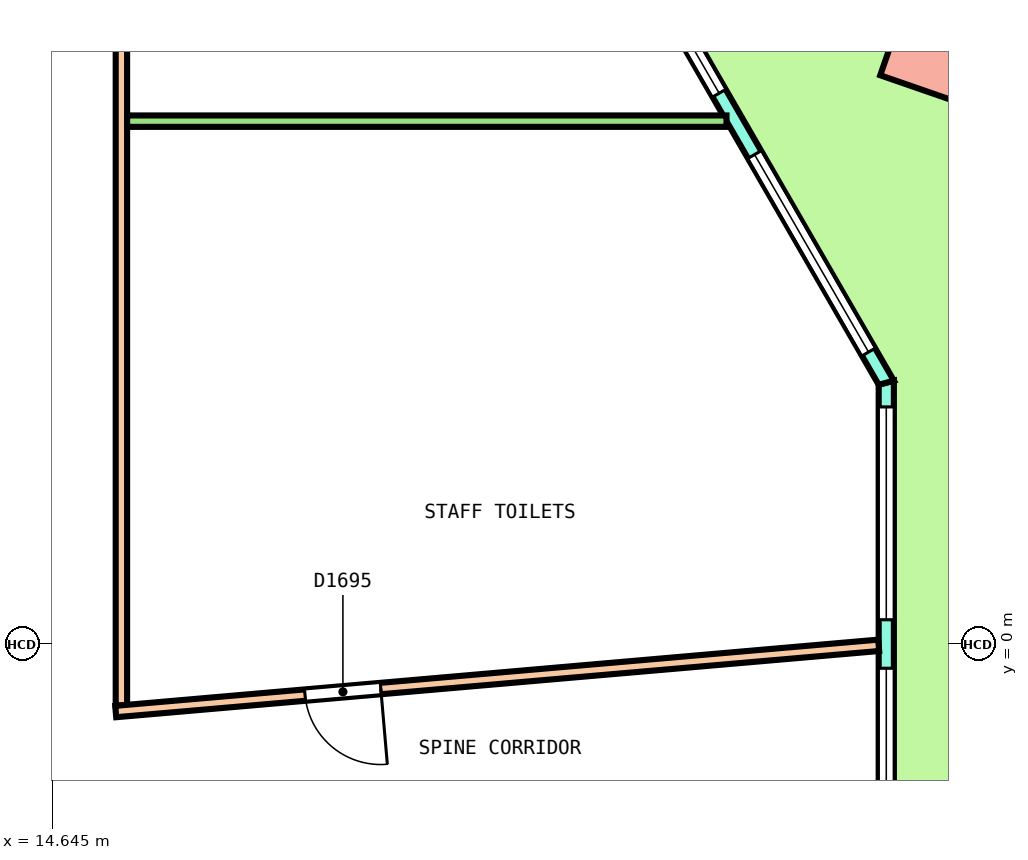
"""IFC4 building model, lengths in metres.
Left out: names, types, materials, properties, quantities, classifications, styles, units other than length and angle.
Written with IfcOpenShell. Run it as: python <this file> out.ifc"""

import sys

from ifc_helpers import new_model, si_unit, direction, frame, frame_2d, origin, origin_2d, place, context, subcontext, project, spatial, polyline, rectangle, outline, extrude, element, fill, save


model = new_model("IFC4")
c1 = context("Model", 3, precision=1e-05, world=origin(), true_north=direction((0.0, 1.0)))
c2 = subcontext(c1, "Body", "Model", "MODEL_VIEW")
j1 = project(units=[si_unit("LENGTHUNIT", "METRE"), si_unit("PLANEANGLEUNIT", "RADIAN")], contexts=[c1])
p1 = place(None, origin())
s1 = spatial("IfcSite", under=j1, at=p1, CompositionType="ELEMENT")
p2 = place(p1, origin())
s2 = spatial("IfcBuilding", under=s1, at=p2, CompositionType="ELEMENT")
p3 = place(p2, frame((0.0, 0.0, 145.2)))
s3 = spatial("IfcBuildingStorey", under=s2, at=p3, CompositionType="ELEMENT", Elevation=145.2)
p4 = place(p3, frame((26.297, 7.853, 0.0), z_axis=(0.021749390218, 0.025123256844, 0.9994477405), x_axis=(-0.500115620545, 0.865890253502, -0.010882783573)))
e1 = element("IfcColumn", 1, at=p4, inside=s3, PredefinedType="COLUMN", context=c2, shape_type="SweptSolid", body=[
    extrude(rectangle(XDim=1.2, YDim=1.2, at=origin_2d()), origin(), (0.0, 0.0, 1.0), 4.052),
])
p5 = place(p3, frame((25.613, -3.437, 0.0), z_axis=(0.0, 0.0, 1.0), x_axis=(0.0, 1.0, 0.0)))
e2 = element("IfcWall", 2, at=p5, inside=s3, PredefinedType="SOLIDWALL", context=c2, shape_type="SweptSolid", body=[
    extrude(outline(polyline([(-0.027, -0.1), (1.128, -0.1), (2.282, -0.1), (3.437, -0.1), (4.592, -0.1), (5.747, -0.1), (6.901, -0.1), (6.848, 0.1), (5.711, 0.1), (4.574, 0.1), (3.437, 0.1), (2.301, 0.1), (1.164, 0.1), (0.027, 0.1), (-0.027, -0.1)])), origin(), (0.0, 0.0, 1.0), 4.1),
])
p6 = place(p5, frame((0.319, 0.0, 0.1)))
e3 = element("IfcOpeningElement", 3, at=p6, cuts=e2, PredefinedType="OPENING", context=c2, shape_type="SweptSolid", body=[
    extrude(rectangle(XDim=2.8, YDim=2.9, at=frame_2d((1.4, 1.45))), frame((0.0, 0.11, 0.0), z_axis=(0.0, -1.0, 0.0), x_axis=(1.0, 0.0, 0.0)), (0.0, 0.0, 1.0), 0.22),
])
p7 = place(p5, frame((3.756, 0.0, 0.1)))
e4 = element("IfcOpeningElement", 4, at=p7, cuts=e2, PredefinedType="OPENING", context=c2, shape_type="SweptSolid", body=[
    extrude(rectangle(XDim=2.8, YDim=2.9, at=frame_2d((1.4, 1.45))), frame((0.0, 0.11, 0.0), z_axis=(0.0, -1.0, 0.0), x_axis=(1.0, 0.0, 0.0)), (0.0, 0.0, 1.0), 0.22),
])
p8 = place(p3, frame((25.613, 3.437, 0.0), z_axis=(0.0, 0.0, 1.0), x_axis=(-0.499999083763, 0.866025932773, 0.0)))
e5 = element("IfcWall", 5, at=p8, inside=s3, PredefinedType="SOLIDWALL", context=c2, shape_type="SweptSolid", body=[
    extrude(outline(polyline([(-0.027, -0.1), (1.011, -0.1), (2.048, -0.1), (3.086, -0.1), (4.123, -0.1), (5.161, -0.1), (6.198, -0.1), (7.236, -0.1), (8.273, -0.1), (9.311, -0.1), (10.348, -0.1), (11.386, -0.1), (12.423, -0.1), (13.461, -0.1), (14.499, -0.1), (15.536, -0.1), (16.573, -0.1), (17.611, -0.1), (18.648, -0.1), (19.686, -0.1), (19.632, 0.1), (18.6, 0.1), (17.569, 0.1), (16.537, 0.1), (15.505, 0.1), (14.473, 0.1), (13.441, 0.1), (12.409, 0.1), (11.377, 0.1), (10.345, 0.1), (9.314, 0.1), (8.282, 0.1), (7.25, 0.1), (6.218, 0.1), (5.186, 0.1), (4.154, 0.1), (3.123, 0.1), (2.091, 0.1), (1.059, 0.1), (0.027, 0.1), (-0.027, -0.1)])), origin(), (0.0, 0.0, 1.0), 4.1),
])
p9 = place(p8, frame((0.466, 0.0, 0.1)))
e6 = element("IfcOpeningElement", 6, at=p9, cuts=e5, PredefinedType="OPENING", context=c2, shape_type="SweptSolid", body=[
    extrude(rectangle(XDim=3.0, YDim=2.9, at=frame_2d((1.5, 1.45))), frame((0.0, 0.11, 0.0), z_axis=(0.0, -1.0, 0.0), x_axis=(1.0, 0.0, 0.0)), (0.0, 0.0, 1.0), 0.22),
])
p10 = place(p8, frame((4.398, 0.0, 0.1)))
e7 = element("IfcOpeningElement", 7, at=p10, cuts=e5, PredefinedType="OPENING", context=c2, shape_type="SweptSolid", body=[
    extrude(rectangle(XDim=3.0, YDim=2.9, at=frame_2d((1.5, 1.45))), frame((0.0, 0.11, 0.0), z_axis=(0.0, -1.0, 0.0), x_axis=(1.0, 0.0, 0.0)), (0.0, 0.0, 1.0), 0.22),
])
p11 = place(p8, frame((8.93, 0.0, 0.0)))
e8 = element("IfcOpeningElement", 8, at=p11, cuts=e5, PredefinedType="OPENING", context=c2, shape_type="SweptSolid", body=[
    extrude(rectangle(XDim=1.8, YDim=2.4, at=frame_2d((0.9, 1.2))), frame((0.0, 0.11, 0.0), z_axis=(0.0, -1.0, 0.0), x_axis=(1.0, 0.0, 0.0)), (0.0, 0.0, 1.0), 0.22),
])
p12 = place(p8, frame((8.93, 0.0, 2.55)))
e9 = element("IfcOpeningElement", 9, at=p12, cuts=e5, PredefinedType="OPENING", context=c2, shape_type="SweptSolid", body=[
    extrude(rectangle(XDim=1.8, YDim=0.45, at=frame_2d((0.9, 0.225))), frame((0.0, 0.11, 0.0), z_axis=(0.0, -1.0, 0.0), x_axis=(1.0, 0.0, 0.0)), (0.0, 0.0, 1.0), 0.22),
])
p13 = place(p8, frame((12.261, 0.0, 0.1)))
e10 = element("IfcOpeningElement", 10, at=p13, cuts=e5, PredefinedType="OPENING", context=c2, shape_type="SweptSolid", body=[
    extrude(rectangle(XDim=3.0, YDim=2.9, at=frame_2d((1.5, 1.45))), frame((0.0, 0.11, 0.0), z_axis=(0.0, -1.0, 0.0), x_axis=(1.0, 0.0, 0.0)), (0.0, 0.0, 1.0), 0.22),
])
p14 = place(p8, frame((16.193, 0.0, 0.1)))
e11 = element("IfcOpeningElement", 11, at=p14, cuts=e5, PredefinedType="OPENING", context=c2, shape_type="SweptSolid", body=[
    extrude(rectangle(XDim=3.0, YDim=2.9, at=frame_2d((1.5, 1.45))), frame((0.0, 0.11, 0.0), z_axis=(0.0, -1.0, 0.0), x_axis=(1.0, 0.0, 0.0)), (0.0, 0.0, 1.0), 0.22),
])
p15 = place(p3, frame((15.55, -0.807, 0.0), z_axis=(0.0, 0.0, 1.0), x_axis=(0.0, 1.0, 0.0)))
e12 = element("IfcWall", 12, at=p15, inside=s3, PredefinedType="PARTITIONING", context=c2, shape_type="SweptSolid", body=[
    extrude(rectangle(XDim=11.182, YDim=0.15, at=frame_2d((5.591, 0.0))), origin(), (0.0, 0.0, 1.0), 3.05),
])
p16 = place(p15, frame((8.621, 0.0, 0.0)))
e13 = element("IfcOpeningElement", 13, at=p16, cuts=e12, PredefinedType="OPENING", context=c2, shape_type="SweptSolid", body=[
    extrude(rectangle(XDim=1.2, YDim=2.1, at=frame_2d((0.6, 1.05))), frame((0.0, 0.085, 0.0), z_axis=(0.0, -1.0, 0.0), x_axis=(1.0, 0.0, 0.0)), (0.0, 0.0, 1.0), 0.17),
])
p17 = place(p3, frame((15.475, -0.888, 0.0), z_axis=(0.0, 0.0, 1.0), x_axis=(0.996255304015, 0.086460217564, 0.0)))
e14 = element("IfcWall", 14, at=p17, inside=s3, PredefinedType="PARTITIONING", context=c2, shape_type="SweptSolid", body=[
    extrude(rectangle(XDim=10.075, YDim=0.15, at=frame_2d((5.038, 0.0))), origin(), (0.0, 0.0, 1.0), 3.05),
])
p18 = place(p17, frame((2.5, 0.0, 0.0)))
e15 = element("IfcOpeningElement", 15, at=p18, cuts=e14, PredefinedType="OPENING", context=c2, shape_type="SweptSolid", body=[
    extrude(rectangle(XDim=1.0, YDim=2.1, at=frame_2d((0.5, 1.05))), frame((0.0, 0.085, 0.0), z_axis=(0.0, -1.0, 0.0), x_axis=(1.0, 0.0, 0.0)), (0.0, 0.0, 1.0), 0.17),
])
p19 = place(p3, frame((15.625, 6.878, 0.0), z_axis=(0.0, 0.0, 1.0), x_axis=(1.0, 0.0, 0.0)))
e16 = element("IfcWall", 16, at=p19, inside=s3, PredefinedType="PARTITIONING", context=c2, shape_type="SweptSolid", body=[
    extrude(rectangle(XDim=7.885, YDim=0.15, at=frame_2d((3.943, 0.0))), origin(), (0.0, 0.0, 1.0), 3.05),
])
p20 = place(p6, origin())
e17 = element("IfcWindow", 17, at=p20, inside=s3, PartitioningType="SINGLE_PANEL", PredefinedType="WINDOW", context=c2, shape_type="SweptSolid", body=[
    extrude(rectangle(XDim=2.8, YDim=2.9, at=frame_2d((1.4, 1.45))), frame((0.0, 0.03, 0.0), z_axis=(0.0, -1.0, 0.0), x_axis=(1.0, 0.0, 0.0)), (0.0, 0.0, 1.0), 0.06),
])
fill(e3, e17)
p21 = place(p7, origin())
e18 = element("IfcWindow", 18, at=p21, inside=s3, PartitioningType="SINGLE_PANEL", PredefinedType="WINDOW", context=c2, shape_type="SweptSolid", body=[
    extrude(rectangle(XDim=2.8, YDim=2.9, at=frame_2d((1.4, 1.45))), frame((0.0, 0.03, 0.0), z_axis=(0.0, -1.0, 0.0), x_axis=(1.0, 0.0, 0.0)), (0.0, 0.0, 1.0), 0.06),
])
fill(e4, e18)
p22 = place(p9, origin())
e19 = element("IfcWindow", 19, at=p22, inside=s3, PartitioningType="SINGLE_PANEL", PredefinedType="WINDOW", context=c2, shape_type="SweptSolid", body=[
    extrude(rectangle(XDim=3.0, YDim=2.9, at=frame_2d((1.5, 1.45))), frame((0.0, 0.03, 0.0), z_axis=(0.0, -1.0, 0.0), x_axis=(1.0, 0.0, 0.0)), (0.0, 0.0, 1.0), 0.06),
])
fill(e6, e19)
p23 = place(p10, origin())
e20 = element("IfcWindow", 20, at=p23, inside=s3, PartitioningType="SINGLE_PANEL", PredefinedType="WINDOW", context=c2, shape_type="SweptSolid", body=[
    extrude(rectangle(XDim=3.0, YDim=2.9, at=frame_2d((1.5, 1.45))), frame((0.0, 0.03, 0.0), z_axis=(0.0, -1.0, 0.0), x_axis=(1.0, 0.0, 0.0)), (0.0, 0.0, 1.0), 0.06),
])
fill(e7, e20)
p24 = place(p18, origin())
e21 = element("IfcDoor", 21, at=p24, inside=s3, OperationType="SINGLE_SWING_LEFT", PredefinedType="DOOR", context=c2, shape_type="SweptSolid", body=[
    extrude(rectangle(XDim=1.0, YDim=2.1, at=frame_2d((0.5, 1.05))), frame((0.0, 0.025, 0.0), z_axis=(0.0, -1.0, 0.0), x_axis=(1.0, 0.0, 0.0)), (0.0, 0.0, 1.0), 0.05),
])
fill(e15, e21)
save(model, sys.argv[1])
